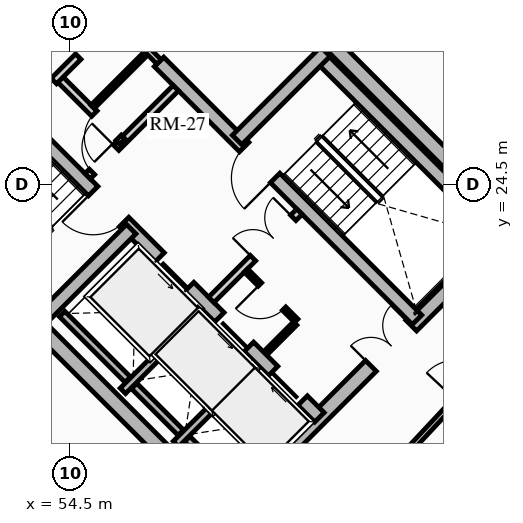
"""IFC4 building model, lengths in metres.
Left out: names, types, materials, properties, quantities, classifications, styles, units other than length and angle.
Written with IfcOpenShell. Run it as: python <this file> out.ifc"""

import sys

from ifc_helpers import new_model, si_unit, direction, frame, frame_2d, origin, place, context, subcontext, project, spatial, rectangle, extrude, source, transform, mapped, element, fill, save


model = new_model("IFC4")
c1 = context("Model", 3, precision=1e-05, world=origin(), true_north=direction((0.0, 1.0)))
c2 = subcontext(c1, "Body", "Model", "MODEL_VIEW")
j1 = project(units=[si_unit("LENGTHUNIT", "METRE"), si_unit("PLANEANGLEUNIT", "RADIAN")], contexts=[c1])
p1 = place(None, origin())
s1 = spatial("IfcSite", under=j1, at=p1, CompositionType="ELEMENT")
p2 = place(p1, origin())
s2 = spatial("IfcBuilding", under=s1, at=p2, CompositionType="ELEMENT")
p3 = place(p2, frame((0.0, 0.0, 151.6)))
s3 = spatial("IfcBuildingStorey", under=s2, at=p3, CompositionType="ELEMENT", Elevation=151.6)
for number, where, z_axis, x_axis in (
    (1, (58.702, 15.732, 0.0), (0.0, 0.0, 1.0), (-0.707, 0.707, 0.0)),
    (2, (66.268, 23.298, 0.0), (0.0, 0.0, 1.0), (-0.707, 0.707, 0.0)),
):
    element("IfcWall", number, at=place(p3, frame(where, z_axis=z_axis, x_axis=x_axis)), inside=s3, PredefinedType="SHEAR", context=c2, shape_type="SweptSolid", body=[
        extrude(rectangle(XDim=14.1, YDim=0.4, at=frame_2d((7.05, 0.0))), origin(), (0.0, 0.0, 1.0), 2.91),
    ])
p4 = place(p3, frame((58.561, 15.873, 0.0), z_axis=(0.0, 0.0, 1.0), x_axis=(0.707106781187, 0.707106781187, 0.0)))
e3 = element("IfcWall", 3, at=p4, inside=s3, PredefinedType="SHEAR", context=c2, shape_type="SweptSolid", body=[
    extrude(rectangle(XDim=10.7, YDim=0.4, at=frame_2d((5.35, 0.0))), origin(), (0.0, 0.0, 1.0), 2.91),
])
m1 = source(origin(), c2, "Body", "SweptSolid", [
    extrude(rectangle(XDim=1.5, YDim=2.02, at=frame_2d((0.75, 1.01))), frame((0.0, 0.21, 0.0), z_axis=(0.0, -1.0, 0.0), x_axis=(1.0, 0.0, 0.0)), (0.0, 0.0, 1.0), 0.42),
])
p5 = place(p4, frame((5.45, 0.0, 0.0)))
e4 = element("IfcOpeningElement", 4, at=p5, cuts=e3, PredefinedType="OPENING", context=c2, shape_type="MappedRepresentation", body=[
    mapped(m1, transform((0.0, 0.0, 0.0), x_axis=(1.0, 0.0, 0.0), y_axis=(0.0, 1.0, 0.0), z_axis=(0.0, 0.0, 1.0), scale=1.0)),
])
p6 = place(p3, frame((48.873, 25.561, 0.0), z_axis=(0.0, 0.0, 1.0), x_axis=(0.707106781187, 0.707106781187, 0.0)))
e5 = element("IfcWall", 5, at=p6, inside=s3, PredefinedType="SHEAR", context=c2, shape_type="SweptSolid", body=[
    extrude(rectangle(XDim=10.7, YDim=0.4, at=frame_2d((5.35, 0.0))), origin(), (0.0, 0.0, 1.0), 2.91),
])
p7 = place(p6, frame((4.6, 0.0, 0.0)))
e6 = element("IfcOpeningElement", 6, at=p7, cuts=e5, PredefinedType="OPENING", context=c2, shape_type="MappedRepresentation", body=[
    mapped(m1, transform((0.0, 0.0, 0.0), x_axis=(1.0, 0.0, 0.0), y_axis=(0.0, 1.0, 0.0), z_axis=(0.0, 0.0, 1.0), scale=1.0)),
])
p8 = place(p3, frame((61.06, 18.373, 0.0), z_axis=(0.0, 0.0, 1.0), x_axis=(-0.707106781187, 0.707106781187, 0.0)))
e7 = element("IfcWall", 7, at=p8, inside=s3, PredefinedType="SHEAR", context=c2, shape_type="SweptSolid", body=[
    extrude(rectangle(XDim=13.7, YDim=0.35, at=frame_2d((6.85, 0.0))), origin(), (0.0, 0.0, 1.0), 2.91),
])
m2 = source(origin(), c2, "Body", "SweptSolid", [
    extrude(rectangle(XDim=1.1, YDim=2.015, at=frame_2d((0.55, 1.007))), frame((0.0, 0.185, 0.0), z_axis=(0.0, -1.0, 0.0), x_axis=(1.0, 0.0, 0.0)), (0.0, 0.0, 1.0), 0.37),
])
p9 = place(p8, frame((4.85, 0.0, 0.0)))
e8 = element("IfcOpeningElement", 8, at=p9, cuts=e7, PredefinedType="OPENING", context=c2, shape_type="MappedRepresentation", body=[
    mapped(m2, transform((0.0, 0.0, 0.0), x_axis=(1.0, 0.0, 0.0), y_axis=(0.0, 1.0, 0.0), z_axis=(0.0, 0.0, 1.0), scale=1.0)),
])
p10 = place(p8, frame((0.625, 0.0, 0.0)))
e9 = element("IfcOpeningElement", 9, at=p10, cuts=e7, PredefinedType="OPENING", context=c2, shape_type="MappedRepresentation", body=[
    mapped(m2, transform((0.0, 0.0, 0.0), x_axis=(1.0, 0.0, 0.0), y_axis=(0.0, 1.0, 0.0), z_axis=(0.0, 0.0, 1.0), scale=1.0)),
])
p11 = place(p8, frame((2.625, 0.0, 0.0)))
e10 = element("IfcOpeningElement", 10, at=p11, cuts=e7, PredefinedType="OPENING", context=c2, shape_type="MappedRepresentation", body=[
    mapped(m2, transform((0.0, 0.0, 0.0), x_axis=(1.0, 0.0, 0.0), y_axis=(0.0, 1.0, 0.0), z_axis=(0.0, 0.0, 1.0), scale=1.0)),
])
m3 = source(origin(), c2, "Body", "SweptSolid", [
    extrude(rectangle(XDim=1.15, YDim=2.02, at=frame_2d((0.575, 1.01))), frame((0.0, 0.185, 0.0), z_axis=(0.0, -1.0, 0.0), x_axis=(1.0, 0.0, 0.0)), (0.0, 0.0, 1.0), 0.37),
])
p12 = place(p8, frame((7.27, 0.0, 0.0)))
e11 = element("IfcOpeningElement", 11, at=p12, cuts=e7, PredefinedType="OPENING", context=c2, shape_type="MappedRepresentation", body=[
    mapped(m3, transform((0.0, 0.0, 0.0), x_axis=(1.0, 0.0, 0.0), y_axis=(0.0, 1.0, 0.0), z_axis=(0.0, 0.0, 1.0), scale=1.0)),
])
p13 = place(p3, frame((63.627, 20.94, 0.0), z_axis=(0.0, 0.0, 1.0), x_axis=(-0.707119496762, 0.707094065383, 0.0)))
e12 = element("IfcWall", 12, at=p13, inside=s3, PredefinedType="SHEAR", context=c2, shape_type="SweptSolid", body=[
    extrude(rectangle(XDim=9.6, YDim=0.35, at=frame_2d((4.8, 0.0))), origin(), (0.0, 0.0, 1.0), 2.91),
])
p14 = place(p13, frame((5.28, 0.0, 0.0)))
e13 = element("IfcOpeningElement", 13, at=p14, cuts=e12, PredefinedType="OPENING", context=c2, shape_type="MappedRepresentation", body=[
    mapped(m3, transform((0.0, 0.0, 0.0), x_axis=(1.0, 0.0, 0.0), y_axis=(0.0, 1.0, 0.0), z_axis=(0.0, 0.0, 1.0), scale=1.0)),
])
p15 = place(p3, frame((53.922, 21.141, 0.0), z_axis=(0.0, 0.0, 1.0), x_axis=(-0.707106781187, 0.707106781187, 0.0)))
e14 = element("IfcWall", 14, at=p15, inside=s3, PredefinedType="SHEAR", context=c2, shape_type="SweptSolid", body=[
    extrude(rectangle(XDim=6.695, YDim=0.35, at=frame_2d((3.348, 0.0))), origin(), (0.0, 0.0, 1.0), 2.91),
])
p16 = place(p3, frame((53.784, 21.003, 0.0), z_axis=(0.0, 0.0, 1.0), x_axis=(0.707106781187, 0.707106781187, 0.0)))
e15 = element("IfcWall", 15, at=p16, inside=s3, PredefinedType="SHEAR", context=c2, shape_type="SweptSolid", body=[
    extrude(rectangle(XDim=3.285, YDim=0.35, at=frame_2d((1.643, 0.0))), origin(), (0.0, 0.0, 1.0), 2.91),
])
p17 = place(p3, frame((65.812, 23.125, 0.0), z_axis=(0.0, 0.0, 1.0), x_axis=(-0.707106781187, 0.707106781187, 0.0)))
e16 = element("IfcWall", 16, at=p17, inside=s3, PredefinedType="SHEAR", context=c2, shape_type="SweptSolid", body=[
    extrude(rectangle(XDim=6.695, YDim=0.35, at=frame_2d((3.348, 0.0))), origin(), (0.0, 0.0, 1.0), 2.91),
])
p18 = place(p3, frame((58.893, 25.674, 0.0), z_axis=(0.0, 0.0, 1.0), x_axis=(0.707106781187, 0.707106781187, 0.0)))
e17 = element("IfcWall", 17, at=p18, inside=s3, PredefinedType="SHEAR", context=c2, shape_type="SweptSolid", body=[
    extrude(rectangle(XDim=3.285, YDim=0.35, at=frame_2d((1.643, 0.0))), origin(), (0.0, 0.0, 1.0), 2.91),
])
p19 = place(p3, frame((55.888, 19.069, 0.0), z_axis=(0.0, 0.0, 1.0), x_axis=(0.707106781187, 0.707106781187, 0.0)))
e18 = element("IfcWall", 18, at=p19, inside=s3, PredefinedType="SHEAR", context=c2, shape_type="SweptSolid", body=[
    extrude(rectangle(XDim=2.97, YDim=0.2, at=frame_2d((1.485, 0.0))), origin(), (0.0, 0.0, 1.0), 2.91),
])
p20 = place(p3, frame((56.015, 19.366, 0.0), z_axis=(0.0, 0.0, 1.0), x_axis=(-0.707106781187, 0.707106781187, 0.0)))
e19 = element("IfcWall", 19, at=p20, inside=s3, PredefinedType="SHEAR", context=c2, shape_type="SweptSolid", body=[
    extrude(rectangle(XDim=2.44, YDim=0.2, at=frame_2d((1.22, 0.0))), origin(), (0.0, 0.0, 1.0), 2.91),
])
p21 = place(p3, frame((57.284, 17.673, 0.0), z_axis=(0.0, 0.0, 1.0), x_axis=(0.707147878904, 0.70706568108, 0.0)))
e20 = element("IfcWall", 20, at=p21, inside=s3, PredefinedType="SHEAR", context=c2, shape_type="SweptSolid", body=[
    extrude(rectangle(XDim=2.97, YDim=0.2, at=frame_2d((1.485, 0.0))), origin(), (0.0, 0.0, 1.0), 2.91),
])
p22 = place(p3, frame((57.412, 17.97, 0.0), z_axis=(0.0, 0.0, 1.0), x_axis=(-0.707106781187, 0.707106781187, 0.0)))
e21 = element("IfcWall", 21, at=p22, inside=s3, PredefinedType="SHEAR", context=c2, shape_type="SweptSolid", body=[
    extrude(rectangle(XDim=1.735, YDim=0.2, at=frame_2d((0.867, 0.0))), origin(), (0.0, 0.0, 1.0), 2.91),
])
p23 = place(p3, frame((58.737, 16.644, 0.0), z_axis=(0.0, 0.0, 1.0), x_axis=(-0.707032117043, 0.707181437447, 0.0)))
e22 = element("IfcWall", 22, at=p23, inside=s3, PredefinedType="SHEAR", context=c2, shape_type="SweptSolid", body=[
    extrude(rectangle(XDim=1.635, YDim=0.2, at=frame_2d((0.817, 0.0))), origin(), (0.0, 0.0, 1.0), 2.91),
])
p24 = place(p3, frame((58.214, 21.467, 0.0), z_axis=(0.0, 0.0, 1.0), x_axis=(0.707106781187, 0.707106781187, 0.0)))
e23 = element("IfcWall", 23, at=p24, inside=s3, PredefinedType="PARTITIONING", context=c2, shape_type="SweptSolid", body=[
    extrude(rectangle(XDim=3.28, YDim=0.2, at=frame_2d((1.64, 0.0))), origin(), (0.0, 0.0, 1.0), 2.675),
])
m4 = source(origin(), c2, "Body", "SweptSolid", [
    extrude(rectangle(XDim=1.5, YDim=2.02, at=frame_2d((0.75, 1.01))), frame((0.0, 0.11, 0.0), z_axis=(0.0, -1.0, 0.0), x_axis=(1.0, 0.0, 0.0)), (0.0, 0.0, 1.0), 0.22),
])
p25 = place(p24, frame((1.55, 0.0, 0.0)))
e24 = element("IfcOpeningElement", 24, at=p25, cuts=e23, PredefinedType="OPENING", context=c2, shape_type="MappedRepresentation", body=[
    mapped(m4, transform((0.0, 0.0, 0.0), x_axis=(1.0, 0.0, 0.0), y_axis=(0.0, 1.0, 0.0), z_axis=(0.0, 0.0, 1.0), scale=1.0)),
])
p26 = place(p3, frame((54.961, 24.719, 0.0), z_axis=(0.0, 0.0, 1.0), x_axis=(0.707106781187, 0.707106781187, 0.0)))
e25 = element("IfcWall", 25, at=p26, inside=s3, PredefinedType="PARTITIONING", context=c2, shape_type="SweptSolid", body=[
    extrude(rectangle(XDim=3.28, YDim=0.2, at=frame_2d((1.64, 0.0))), origin(), (0.0, 0.0, 1.0), 2.675),
])
m5 = source(origin(), c2, "Body", "SweptSolid", [
    extrude(rectangle(XDim=0.9, YDim=2.005, at=frame_2d((0.45, 1.002))), frame((0.0, 0.11, 0.0), z_axis=(0.0, -1.0, 0.0), x_axis=(1.0, 0.0, 0.0)), (0.0, 0.0, 1.0), 0.22),
])
p27 = place(p26, frame((0.16, 0.0, 0.0)))
e26 = element("IfcOpeningElement", 26, at=p27, cuts=e25, PredefinedType="OPENING", context=c2, shape_type="MappedRepresentation", body=[
    mapped(m5, transform((0.0, 0.0, 0.0), x_axis=(1.0, 0.0, 0.0), y_axis=(0.0, 1.0, 0.0), z_axis=(0.0, 0.0, 1.0), scale=1.0)),
])
p28 = place(p3, frame((55.874, 25.631, 0.0), z_axis=(0.0, 0.0, 1.0), x_axis=(-0.707157639372, 0.707055919343, 0.0)))
e27 = element("IfcWall", 27, at=p28, inside=s3, PredefinedType="PARTITIONING", context=c2, shape_type="SweptSolid", body=[
    extrude(rectangle(XDim=2.4, YDim=0.2, at=frame_2d((1.2, 0.0))), origin(), (0.0, 0.0, 1.0), 2.675),
])
p29 = place(p28, frame((0.14, 0.0, 0.0)))
e28 = element("IfcOpeningElement", 28, at=p29, cuts=e27, PredefinedType="OPENING", context=c2, shape_type="MappedRepresentation", body=[
    mapped(m5, transform((0.0, 0.0, 0.0), x_axis=(1.0, 0.0, 0.0), y_axis=(0.0, 1.0, 0.0), z_axis=(0.0, 0.0, 1.0), scale=1.0)),
])
p30 = place(p3, frame((53.264, 26.416, 0.0), z_axis=(0.0, 0.0, 1.0), x_axis=(0.707106781187, 0.707106781187, 0.0)))
e29 = element("IfcWall", 29, at=p30, inside=s3, PredefinedType="PARTITIONING", context=c2, shape_type="SweptSolid", body=[
    extrude(rectangle(XDim=3.28, YDim=0.2, at=frame_2d((1.64, 0.0))), origin(), (0.0, 0.0, 1.0), 2.675),
])
m6 = source(origin(), c2, "Body", "SweptSolid", [
    extrude(rectangle(XDim=1.0, YDim=2.015, at=frame_2d((0.5, 1.007))), frame((0.0, 0.11, 0.0), z_axis=(0.0, -1.0, 0.0), x_axis=(1.0, 0.0, 0.0)), (0.0, 0.0, 1.0), 0.22),
])
p31 = place(p30, frame((0.14, 0.0, 0.0)))
e30 = element("IfcOpeningElement", 30, at=p31, cuts=e29, PredefinedType="OPENING", context=c2, shape_type="MappedRepresentation", body=[
    mapped(m6, transform((0.0, 0.0, 0.0), x_axis=(1.0, 0.0, 0.0), y_axis=(0.0, 1.0, 0.0), z_axis=(0.0, 0.0, 1.0), scale=1.0)),
])
p32 = place(p30, frame((2.05, 0.0, 0.0)))
e31 = element("IfcOpeningElement", 31, at=p32, cuts=e29, PredefinedType="OPENING", context=c2, shape_type="MappedRepresentation", body=[
    mapped(m5, transform((0.0, 0.0, 0.0), x_axis=(1.0, 0.0, 0.0), y_axis=(0.0, 1.0, 0.0), z_axis=(0.0, 0.0, 1.0), scale=1.0)),
])
p33 = place(p3, frame((60.448, 20.915, 0.0), z_axis=(0.0, 0.0, 1.0), x_axis=(-0.707106781187, 0.707106781187, 0.0)))
e32 = element("IfcWall", 32, at=p33, inside=s3, PredefinedType="PARTITIONING", context=c2, shape_type="SweptSolid", body=[
    extrude(rectangle(XDim=1.87, YDim=0.125, at=frame_2d((0.935, 0.0))), origin(), (0.0, 0.0, 1.0), 2.675),
])
m7 = source(origin(), c2, "Body", "SweptSolid", [
    extrude(rectangle(XDim=0.9, YDim=2.005, at=frame_2d((0.45, 1.002))), frame((0.0, 0.073, 0.0), z_axis=(0.0, -1.0, 0.0), x_axis=(1.0, 0.0, 0.0)), (0.0, 0.0, 1.0), 0.145),
])
p34 = place(p33, frame((0.45, 0.0, 0.0)))
e33 = element("IfcOpeningElement", 33, at=p34, cuts=e32, PredefinedType="OPENING", context=c2, shape_type="MappedRepresentation", body=[
    mapped(m7, transform((0.0, 0.0, 0.0), x_axis=(1.0, 0.0, 0.0), y_axis=(0.0, 1.0, 0.0), z_axis=(0.0, 0.0, 1.0), scale=1.0)),
])
p35 = place(p3, frame((59.643, 20.066, 0.0), z_axis=(0.0, 0.0, 1.0), x_axis=(0.707106781187, 0.707106781187, 0.0)))
e34 = element("IfcWall", 34, at=p35, inside=s3, PredefinedType="PARTITIONING", context=c2, shape_type="SweptSolid", body=[
    extrude(rectangle(XDim=1.1, YDim=0.125, at=frame_2d((0.55, 0.0))), origin(), (0.0, 0.0, 1.0), 2.675),
])
p36 = place(p3, frame((55.089, 26.543, 0.0), z_axis=(0.0, 0.0, 1.0), x_axis=(0.707106781187, 0.707106781187, 0.0)))
e35 = element("IfcWall", 35, at=p36, inside=s3, PredefinedType="PARTITIONING", context=c2, shape_type="SweptSolid", body=[
    extrude(rectangle(XDim=1.88, YDim=0.125, at=frame_2d((0.94, 0.0))), origin(), (0.0, 0.0, 1.0), 2.675),
])
p37 = place(p3, frame((56.839, 27.728, 0.0), z_axis=(0.0, 0.0, 1.0), x_axis=(-0.707106781187, 0.707106781187, 0.0)))
e36 = element("IfcWall", 36, at=p37, inside=s3, PredefinedType="PARTITIONING", context=c2, shape_type="SweptSolid", body=[
    extrude(rectangle(XDim=3.9, YDim=0.16, at=frame_2d((1.95, 0.0))), origin(), (0.0, 0.0, 1.0), 2.675),
])
m8 = source(origin(), c2, "Body", "SweptSolid", [
    extrude(rectangle(XDim=0.9, YDim=2.005, at=frame_2d((0.45, 1.002))), frame((0.0, 0.09, 0.0), z_axis=(0.0, -1.0, 0.0), x_axis=(1.0, 0.0, 0.0)), (0.0, 0.0, 1.0), 0.18),
])
p38 = place(p37, frame((2.2, 0.0, 0.0)))
e37 = element("IfcOpeningElement", 37, at=p38, cuts=e36, PredefinedType="OPENING", context=c2, shape_type="MappedRepresentation", body=[
    mapped(m8, transform((0.0, 0.0, 0.0), x_axis=(1.0, 0.0, 0.0), y_axis=(0.0, 1.0, 0.0), z_axis=(0.0, 0.0, 1.0), scale=1.0)),
])
p39 = place(p3, frame((52.02, 19.02, 0.0), z_axis=(0.0, 0.0, 1.0), x_axis=(0.699456449804, -0.71467522332, 0.0)))
e38 = element("IfcWall", 38, at=p39, inside=s3, PredefinedType="PARTITIONING", context=c2, shape_type="SweptSolid", body=[
    extrude(rectangle(XDim=6.032, YDim=0.15, at=frame_2d((3.016, 0.0))), origin(), (0.0, 0.0, 1.0), 2.245),
])
p40 = place(p3, frame((62.784, 16.83, 0.0), z_axis=(0.0, 0.0, 1.0), x_axis=(0.682240832942, 0.731127516831, 0.0)))
e39 = element("IfcWall", 39, at=p40, inside=s3, PredefinedType="PARTITIONING", context=c2, shape_type="SweptSolid", body=[
    extrude(rectangle(XDim=6.517, YDim=0.15, at=frame_2d((3.259, 0.0))), origin(), (0.0, 0.0, 1.0), 2.245),
])
m9 = source(origin(), c2, "Body", "SweptSolid", [
    extrude(rectangle(XDim=1.05, YDim=2.015, at=frame_2d((0.525, 1.007))), frame((0.0, 0.085, 0.0), z_axis=(0.0, -1.0, 0.0), x_axis=(1.0, 0.0, 0.0)), (0.0, 0.0, 1.0), 0.17),
])
p41 = place(p40, frame((2.734, 0.0, 0.0)))
e40 = element("IfcOpeningElement", 40, at=p41, cuts=e39, PredefinedType="OPENING", context=c2, shape_type="MappedRepresentation", body=[
    mapped(m9, transform((0.0, 0.0, 0.0), x_axis=(1.0, 0.0, 0.0), y_axis=(0.0, 1.0, 0.0), z_axis=(0.0, 0.0, 1.0), scale=1.0)),
])
m10 = source(origin(), c2, "Body", "SweptSolid", [
    extrude(rectangle(XDim=1.1, YDim=2.015, at=frame_2d((0.55, 1.007))), frame((0.0, 0.025, 0.0), z_axis=(0.0, -1.0, 0.0), x_axis=(1.0, 0.0, 0.0)), (0.0, 0.0, 1.0), 0.05),
])
p42 = place(p9, origin())
e41 = element("IfcDoor", 41, at=p42, inside=s3, OperationType="SLIDING_TO_LEFT", PredefinedType="DOOR", context=c2, shape_type="MappedRepresentation", body=[
    mapped(m10, transform((0.0, 0.0, 0.0), x_axis=(1.0, 0.0, 0.0), y_axis=(0.0, 1.0, 0.0), z_axis=(0.0, 0.0, 1.0), scale=1.0)),
])
fill(e8, e41)
p43 = place(p10, origin())
e42 = element("IfcDoor", 42, at=p43, inside=s3, OperationType="SLIDING_TO_RIGHT", PredefinedType="DOOR", context=c2, shape_type="MappedRepresentation", body=[
    mapped(m10, transform((0.0, 0.0, 0.0), x_axis=(1.0, 0.0, 0.0), y_axis=(0.0, 1.0, 0.0), z_axis=(0.0, 0.0, 1.0), scale=1.0)),
])
fill(e9, e42)
p44 = place(p11, origin())
e43 = element("IfcDoor", 43, at=p44, inside=s3, OperationType="SLIDING_TO_LEFT", PredefinedType="DOOR", context=c2, shape_type="MappedRepresentation", body=[
    mapped(m10, transform((0.0, 0.0, 0.0), x_axis=(1.0, 0.0, 0.0), y_axis=(0.0, 1.0, 0.0), z_axis=(0.0, 0.0, 1.0), scale=1.0)),
])
fill(e10, e43)
m11 = source(origin(), c2, "Body", "SweptSolid", [
    extrude(rectangle(XDim=1.15, YDim=2.02, at=frame_2d((0.575, 1.01))), frame((0.0, 0.025, 0.0), z_axis=(0.0, -1.0, 0.0), x_axis=(1.0, 0.0, 0.0)), (0.0, 0.0, 1.0), 0.05),
])
p45 = place(p12, origin())
e44 = element("IfcDoor", 44, at=p45, inside=s3, OperationType="SINGLE_SWING_RIGHT", PredefinedType="DOOR", context=c2, shape_type="MappedRepresentation", body=[
    mapped(m11, transform((0.0, 0.0, 0.0), x_axis=(1.0, 0.0, 0.0), y_axis=(0.0, 1.0, 0.0), z_axis=(0.0, 0.0, 1.0), scale=1.0)),
])
fill(e11, e44)
p46 = place(p14, origin())
e45 = element("IfcDoor", 45, at=p46, inside=s3, OperationType="SINGLE_SWING_LEFT", PredefinedType="DOOR", context=c2, shape_type="MappedRepresentation", body=[
    mapped(m11, transform((0.0, 0.0, 0.0), x_axis=(1.0, 0.0, 0.0), y_axis=(0.0, 1.0, 0.0), z_axis=(0.0, 0.0, 1.0), scale=1.0)),
])
fill(e13, e45)
m12 = source(origin(), c2, "Body", "SweptSolid", [
    extrude(rectangle(XDim=1.5, YDim=2.02, at=frame_2d((0.75, 1.01))), frame((0.0, 0.025, 0.0), z_axis=(0.0, -1.0, 0.0), x_axis=(1.0, 0.0, 0.0)), (0.0, 0.0, 1.0), 0.05),
])
p47 = place(p5, origin())
e46 = element("IfcDoor", 46, at=p47, inside=s3, OperationType="DOUBLE_DOOR_SINGLE_SWING", PredefinedType="DOOR", context=c2, shape_type="MappedRepresentation", body=[
    mapped(m12, transform((0.0, 0.0, 0.0), x_axis=(1.0, 0.0, 0.0), y_axis=(0.0, 1.0, 0.0), z_axis=(0.0, 0.0, 1.0), scale=1.0)),
])
fill(e4, e46)
p48 = place(p25, origin())
e47 = element("IfcDoor", 47, at=p48, inside=s3, OperationType="DOUBLE_DOOR_SINGLE_SWING", PredefinedType="DOOR", context=c2, shape_type="MappedRepresentation", body=[
    mapped(m12, transform((0.0, 0.0, 0.0), x_axis=(1.0, 0.0, 0.0), y_axis=(0.0, 1.0, 0.0), z_axis=(0.0, 0.0, 1.0), scale=1.0)),
])
fill(e24, e47)
m13 = source(origin(), c2, "Body", "SweptSolid", [
    extrude(rectangle(XDim=0.9, YDim=2.005, at=frame_2d((0.45, 1.002))), frame((0.0, 0.025, 0.0), z_axis=(0.0, -1.0, 0.0), x_axis=(1.0, 0.0, 0.0)), (0.0, 0.0, 1.0), 0.05),
])
p49 = place(p27, origin())
e48 = element("IfcDoor", 48, at=p49, inside=s3, OperationType="SINGLE_SWING_RIGHT", PredefinedType="DOOR", context=c2, shape_type="MappedRepresentation", body=[
    mapped(m13, transform((0.0, 0.0, 0.0), x_axis=(1.0, 0.0, 0.0), y_axis=(0.0, 1.0, 0.0), z_axis=(0.0, 0.0, 1.0), scale=1.0)),
])
fill(e26, e48)
m14 = source(origin(), c2, "Body", "SweptSolid", [
    extrude(rectangle(XDim=1.0, YDim=2.015, at=frame_2d((0.5, 1.007))), frame((0.0, 0.025, 0.0), z_axis=(0.0, -1.0, 0.0), x_axis=(1.0, 0.0, 0.0)), (0.0, 0.0, 1.0), 0.05),
])
p50 = place(p31, origin())
e49 = element("IfcDoor", 49, at=p50, inside=s3, OperationType="SINGLE_SWING_LEFT", PredefinedType="DOOR", context=c2, shape_type="MappedRepresentation", body=[
    mapped(m14, transform((0.0, 0.0, 0.0), x_axis=(1.0, 0.0, 0.0), y_axis=(0.0, 1.0, 0.0), z_axis=(0.0, 0.0, 1.0), scale=1.0)),
])
fill(e30, e49)
p51 = place(p34, origin())
e50 = element("IfcDoor", 50, at=p51, inside=s3, OperationType="SINGLE_SWING_RIGHT", PredefinedType="DOOR", context=c2, shape_type="MappedRepresentation", body=[
    mapped(m13, transform((0.0, 0.0, 0.0), x_axis=(1.0, 0.0, 0.0), y_axis=(0.0, 1.0, 0.0), z_axis=(0.0, 0.0, 1.0), scale=1.0)),
])
fill(e33, e50)
p52 = place(p29, origin())
e51 = element("IfcDoor", 51, at=p52, inside=s3, OperationType="SINGLE_SWING_LEFT", PredefinedType="DOOR", context=c2, shape_type="MappedRepresentation", body=[
    mapped(m13, transform((0.0, 0.0, 0.0), x_axis=(1.0, 0.0, 0.0), y_axis=(0.0, 1.0, 0.0), z_axis=(0.0, 0.0, 1.0), scale=1.0)),
])
fill(e28, e51)
p53 = place(p32, origin())
e52 = element("IfcDoor", 52, at=p53, inside=s3, OperationType="SINGLE_SWING_RIGHT", PredefinedType="DOOR", context=c2, shape_type="MappedRepresentation", body=[
    mapped(m13, transform((0.0, 0.0, 0.0), x_axis=(1.0, 0.0, 0.0), y_axis=(0.0, 1.0, 0.0), z_axis=(0.0, 0.0, 1.0), scale=1.0)),
])
fill(e31, e52)
save(model, sys.argv[1])
